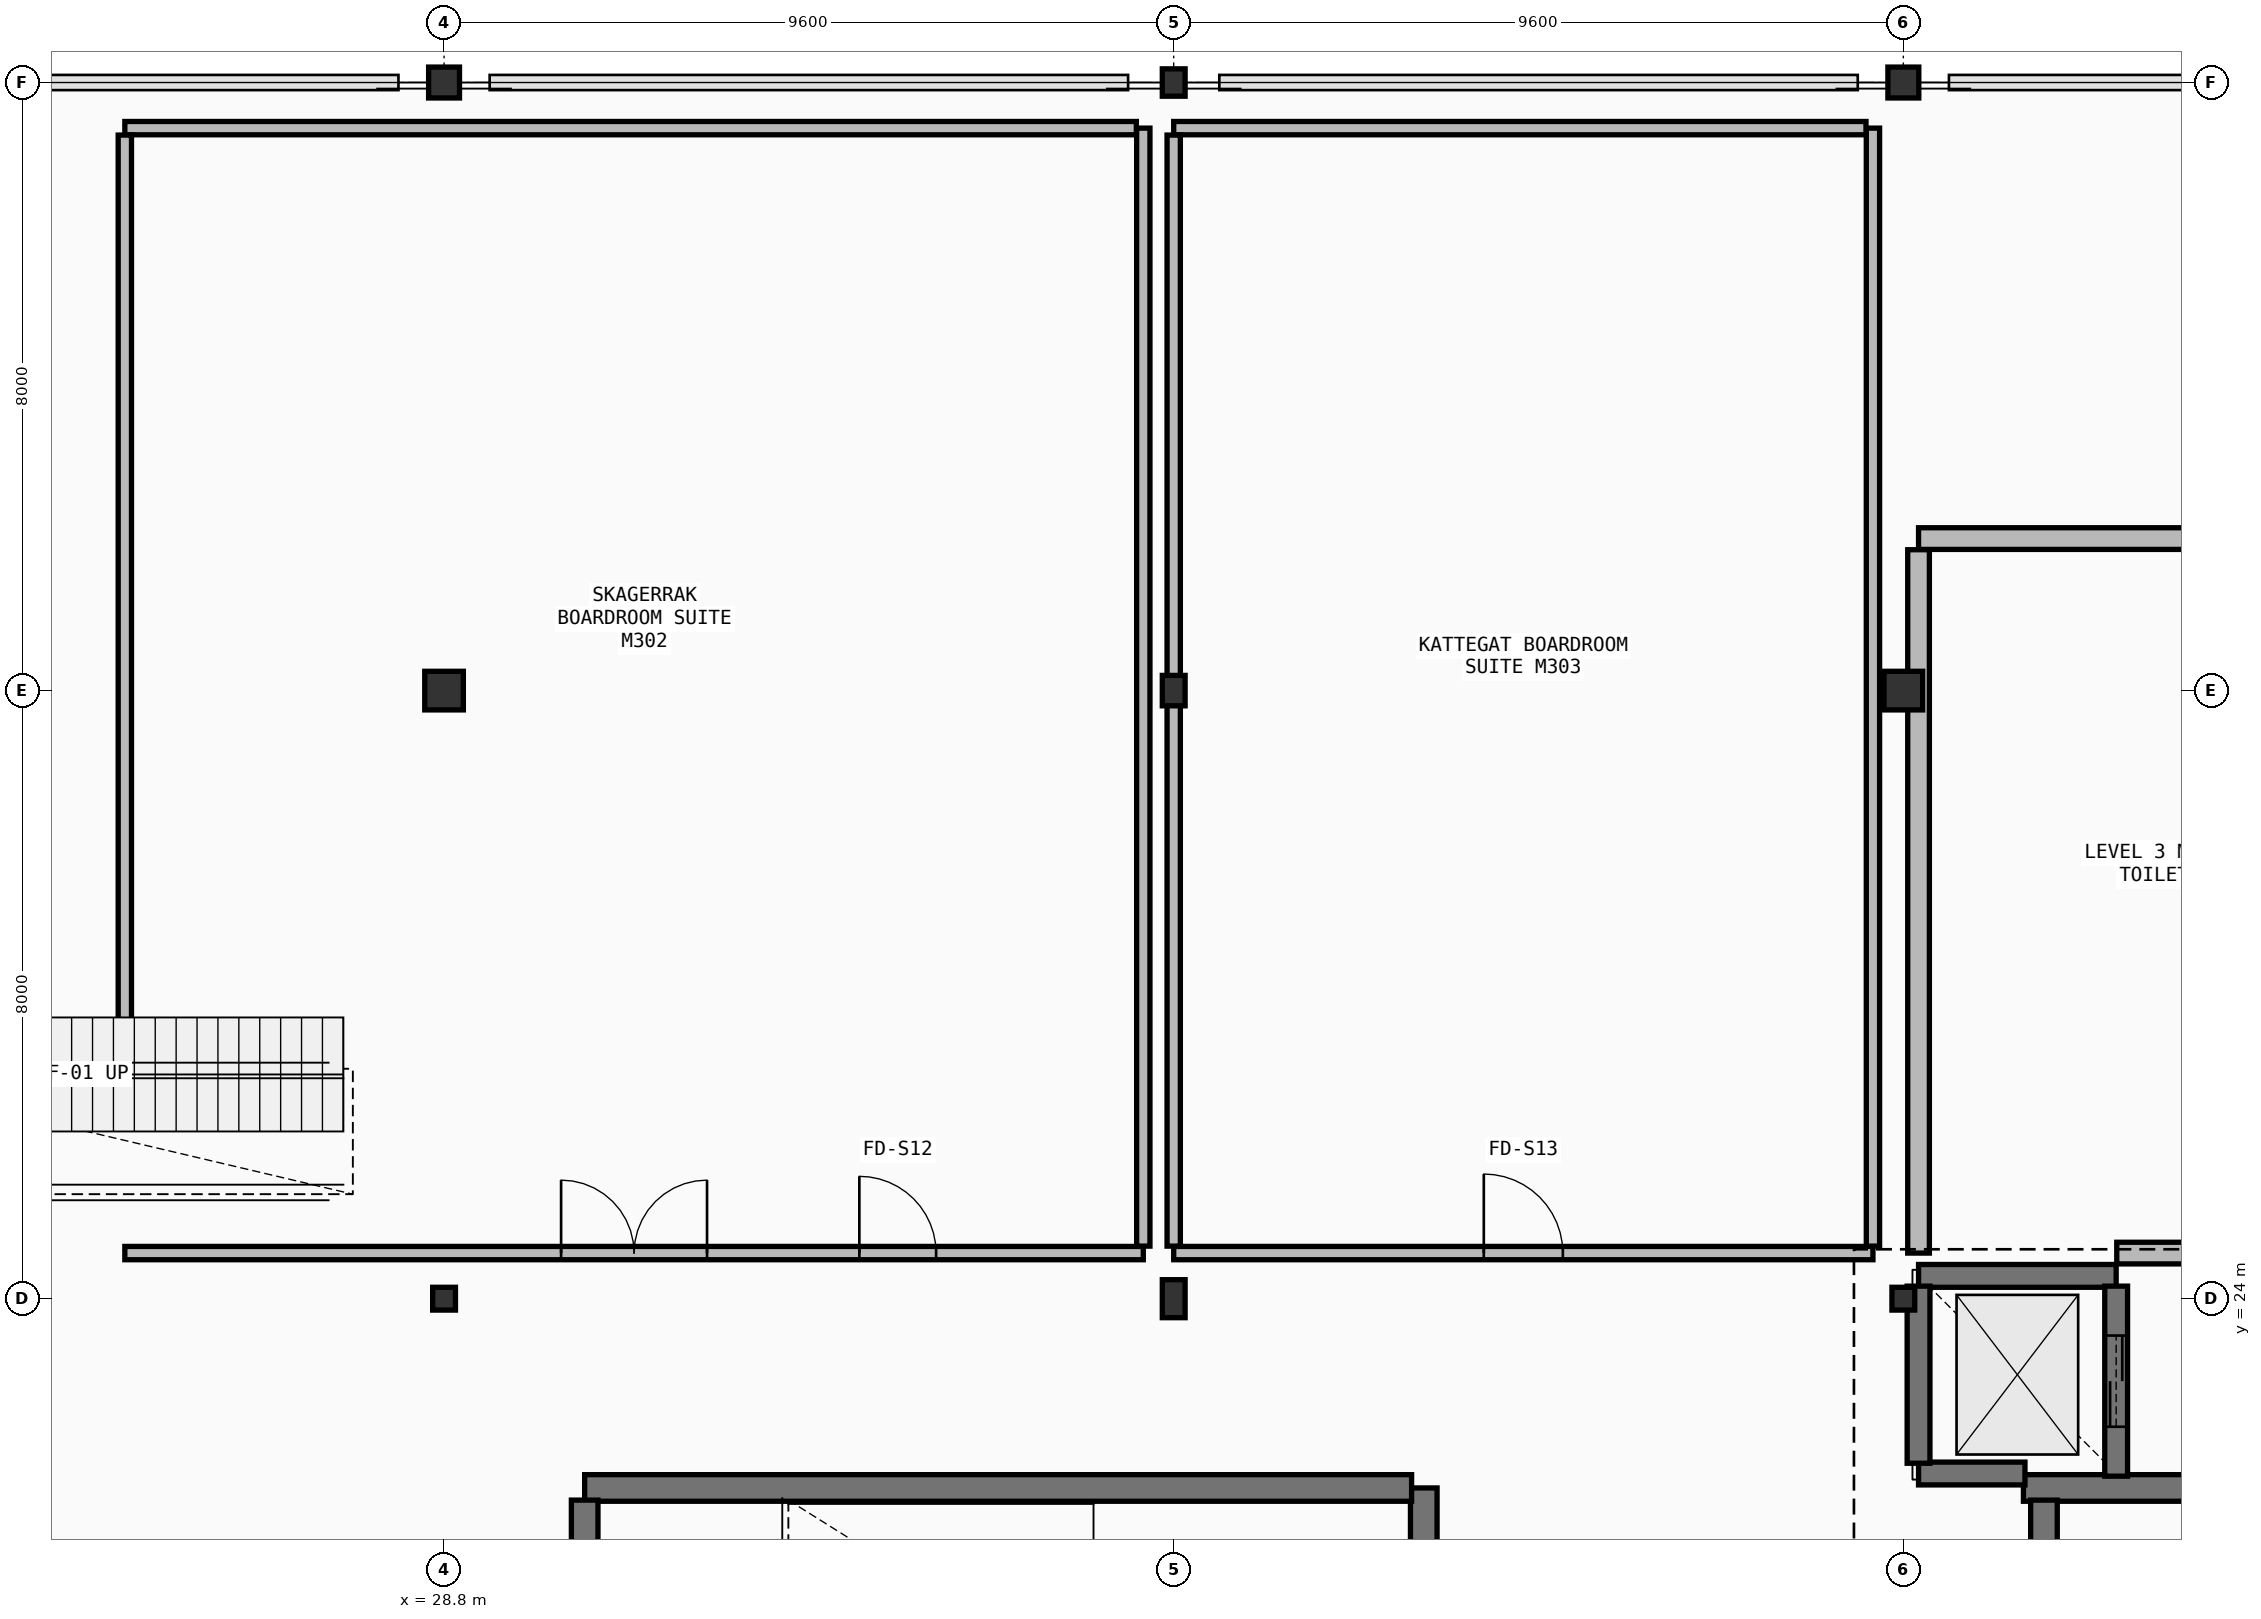
"""IFC4 building model, lengths in metres.
Left out: names, types, materials, properties, quantities, classifications, styles, units other than length and angle.
Written with IfcOpenShell. Run it as: python <this file> out.ifc"""

import sys

from ifc_helpers import new_model, si_unit, direction, frame, frame_2d, origin, origin_2d, place, context, subcontext, project, spatial, rectangle, hollow_circle, i_section, extrude, element, fill, save


model = new_model("IFC4")
c1 = context("Model", 3, precision=1e-05, world=origin(), true_north=direction((0.0, 1.0)))
c2 = subcontext(c1, "Body", "Model", "MODEL_VIEW")
j1 = project(units=[si_unit("LENGTHUNIT", "METRE"), si_unit("PLANEANGLEUNIT", "RADIAN")], contexts=[c1])
p1 = place(None, origin())
s1 = spatial("IfcSite", under=j1, at=p1, CompositionType="ELEMENT")
p2 = place(p1, origin())
s2 = spatial("IfcBuilding", under=s1, at=p2, CompositionType="ELEMENT")
p3 = place(p2, frame((0.0, 0.0, 15.9)))
s3 = spatial("IfcBuildingStorey", under=s2, at=p3, CompositionType="ELEMENT", Elevation=15.9)
p4 = place(p3, frame((28.8, 24.0, 0.0), z_axis=(0.0, 0.0, 1.0), x_axis=(1.0, 0.0, 0.0)))
e1 = element("IfcColumn", 1, at=p4, inside=s3, PredefinedType="COLUMN", context=c2, shape_type="SweptSolid", body=[
    extrude(i_section(OverallWidth=0.3, OverallDepth=0.3, WebThickness=0.011, FlangeThickness=0.019, FilletRadius=0.027, at=origin_2d()), origin(), (0.0, 0.0, 1.0), 4.5),
])
p5 = place(p3, frame((28.8, 32.0, 0.0), z_axis=(0.0, 0.0, 1.0), x_axis=(1.0, 0.0, 0.0)))
e2 = element("IfcColumn", 2, at=p5, inside=s3, PredefinedType="COLUMN", context=c2, shape_type="SweptSolid", body=[
    extrude(hollow_circle(Radius=0.254, WallThickness=0.025, at=origin_2d()), origin(), (0.0, 0.0, 1.0), 4.5),
])
p6 = place(p3, frame((28.8, 40.0, 0.0), z_axis=(0.0, 0.0, 1.0), x_axis=(1.0, 0.0, 0.0)))
e3 = element("IfcColumn", 3, at=p6, inside=s3, PredefinedType="COLUMN", context=c2, shape_type="SweptSolid", body=[
    extrude(hollow_circle(Radius=0.203, WallThickness=0.02, at=origin_2d()), origin(), (0.0, 0.0, 1.0), 4.5),
])
p7 = place(p3, frame((38.4, 24.0, 0.0), z_axis=(0.0, 0.0, 1.0), x_axis=(1.0, 0.0, 0.0)))
e4 = element("IfcColumn", 4, at=p7, inside=s3, PredefinedType="COLUMN", context=c2, shape_type="SweptSolid", body=[
    extrude(i_section(OverallWidth=0.3, OverallDepth=0.5, WebThickness=0.014, FlangeThickness=0.028, FilletRadius=0.027, at=origin_2d()), origin(), (0.0, 0.0, 1.0), 4.5),
])
p8 = place(p3, frame((38.4, 32.0, 0.0), z_axis=(0.0, 0.0, 1.0), x_axis=(1.0, 0.0, 0.0)))
e5 = element("IfcColumn", 5, at=p8, inside=s3, PredefinedType="COLUMN", context=c2, shape_type="SweptSolid", body=[
    extrude(i_section(OverallWidth=0.3, OverallDepth=0.4, WebThickness=0.013, FlangeThickness=0.024, FilletRadius=0.027, at=origin_2d()), origin(), (0.0, 0.0, 1.0), 4.5),
])
p9 = place(p3, frame((38.4, 40.0, 0.0), z_axis=(0.0, 0.0, 1.0), x_axis=(1.0, 0.0, 0.0)))
e6 = element("IfcColumn", 6, at=p9, inside=s3, PredefinedType="COLUMN", context=c2, shape_type="SweptSolid", body=[
    extrude(i_section(OverallWidth=0.3, OverallDepth=0.36, WebThickness=0.012, FlangeThickness=0.022, FilletRadius=0.027, at=origin_2d()), origin(), (0.0, 0.0, 1.0), 4.5),
])
p10 = place(p3, frame((48.0, 24.0, 0.0), z_axis=(0.0, 0.0, 1.0), x_axis=(1.0, 0.0, 0.0)))
e7 = element("IfcColumn", 7, at=p10, inside=s3, PredefinedType="COLUMN", context=c2, shape_type="SweptSolid", body=[
    extrude(i_section(OverallWidth=0.3, OverallDepth=0.3, WebThickness=0.011, FlangeThickness=0.019, FilletRadius=0.027, at=origin_2d()), origin(), (0.0, 0.0, 1.0), 4.5),
])
p11 = place(p3, frame((48.0, 32.0, 0.0), z_axis=(0.0, 0.0, 1.0), x_axis=(1.0, 0.0, 0.0)))
e8 = element("IfcColumn", 8, at=p11, inside=s3, PredefinedType="COLUMN", context=c2, shape_type="SweptSolid", body=[
    extrude(hollow_circle(Radius=0.254, WallThickness=0.025, at=origin_2d()), origin(), (0.0, 0.0, 1.0), 4.5),
])
p12 = place(p3, frame((48.0, 40.0, 0.0), z_axis=(0.0, 0.0, 1.0), x_axis=(1.0, 0.0, 0.0)))
e9 = element("IfcColumn", 9, at=p12, inside=s3, PredefinedType="COLUMN", context=c2, shape_type="SweptSolid", body=[
    extrude(hollow_circle(Radius=0.203, WallThickness=0.02, at=origin_2d()), origin(), (0.0, 0.0, 1.0), 4.5),
])
p13 = place(p3, frame((60.73, 21.51, 0.0), z_axis=(0.0, 0.0, 1.0), x_axis=(-1.0, 0.0, 0.0)))
e10 = element("IfcWall", 10, at=p13, inside=s3, PredefinedType="SHEAR", context=c2, shape_type="SweptSolid", body=[
    extrude(rectangle(XDim=11.15, YDim=0.35, at=frame_2d((5.575, 0.0))), origin(), (0.0, 0.0, 1.0), 4.276),
])
p14 = place(p3, frame((49.85, 21.35, 0.0), z_axis=(0.0, 0.0, 1.0), x_axis=(0.0, -1.0, 0.0)))
e11 = element("IfcWall", 11, at=p14, inside=s3, PredefinedType="SHEAR", context=c2, shape_type="SweptSolid", body=[
    extrude(rectangle(XDim=5.14, YDim=0.35, at=frame_2d((2.57, 0.0))), origin(), (0.0, 0.0, 1.0), 4.276),
])
p15 = place(p3, frame((41.69, 16.21, 0.0), z_axis=(0.0, 0.0, 1.0), x_axis=(0.0, 1.0, 0.0)))
e12 = element("IfcWall", 12, at=p15, inside=s3, PredefinedType="SHEAR", context=c2, shape_type="SweptSolid", body=[
    extrude(rectangle(XDim=5.3, YDim=0.35, at=frame_2d((2.65, 0.0))), origin(), (0.0, 0.0, 1.0), 4.276),
])
p16 = place(p3, frame((41.53, 21.51, 0.0), z_axis=(0.0, 0.0, 1.0), x_axis=(-1.0, 0.0, 0.0)))
e13 = element("IfcWall", 13, at=p16, inside=s3, PredefinedType="SHEAR", context=c2, shape_type="SweptSolid", body=[
    extrude(rectangle(XDim=10.88, YDim=0.35, at=frame_2d((5.44, 0.0))), origin(), (0.0, 0.0, 1.0), 4.276),
])
p17 = place(p3, frame((30.65, 21.35, 0.0), z_axis=(0.0, 0.0, 1.0), x_axis=(0.0, -1.0, 0.0)))
e14 = element("IfcWall", 14, at=p17, inside=s3, PredefinedType="SHEAR", context=c2, shape_type="SweptSolid", body=[
    extrude(rectangle(XDim=5.14, YDim=0.35, at=frame_2d((2.57, 0.0))), origin(), (0.0, 0.0, 1.0), 4.276),
])
p18 = place(p3, frame((50.8, 24.3, 0.0), z_axis=(0.0, 0.0, 1.0), x_axis=(-1.0, 0.0, 0.0)))
e15 = element("IfcWall", 15, at=p18, inside=s3, PredefinedType="SHEAR", context=c2, shape_type="SweptSolid", body=[
    extrude(rectangle(XDim=2.6, YDim=0.3, at=frame_2d((1.3, 0.0))), origin(), (0.0, 0.0, 1.0), 4.276),
])
p19 = place(p3, frame((48.2, 21.7, 0.0), z_axis=(0.0, 0.0, 1.0), x_axis=(1.0, 0.0, 0.0)))
e16 = element("IfcWall", 16, at=p19, inside=s3, PredefinedType="SHEAR", context=c2, shape_type="SweptSolid", body=[
    extrude(rectangle(XDim=1.4, YDim=0.3, at=frame_2d((0.7, 0.0))), origin(), (0.0, 0.0, 1.0), 4.276),
])
p20 = place(p3, frame((50.8, 21.665, 0.0), z_axis=(0.0, 0.0, 1.0), x_axis=(0.0, 1.0, 0.0)))
e17 = element("IfcWall", 17, at=p20, inside=s3, PredefinedType="SHEAR", context=c2, shape_type="SweptSolid", body=[
    extrude(rectangle(XDim=2.5, YDim=0.3, at=frame_2d((1.25, 0.0))), origin(), (0.0, 0.0, 1.0), 4.276),
])
p21 = place(p20, frame((0.65, 0.0, 0.0)))
e18 = element("IfcOpeningElement", 18, at=p21, cuts=e17, PredefinedType="OPENING", context=c2, shape_type="SweptSolid", body=[
    extrude(rectangle(XDim=1.2, YDim=2.2, at=frame_2d((0.6, 1.1))), frame((0.0, 0.16, 0.0), z_axis=(0.0, -1.0, 0.0), x_axis=(1.0, 0.0, 0.0)), (0.0, 0.0, 1.0), 0.32),
])
p22 = place(p3, frame((48.2, 24.165, 0.0), z_axis=(0.0, 0.0, 1.0), x_axis=(0.0, -1.0, 0.0)))
e19 = element("IfcWall", 19, at=p22, inside=s3, PredefinedType="SHEAR", context=c2, shape_type="SweptSolid", body=[
    extrude(rectangle(XDim=2.33, YDim=0.3, at=frame_2d((1.165, 0.0))), origin(), (0.0, 0.0, 1.0), 4.276),
])
p23 = place(p3, frame((24.6, 24.6, 0.0), z_axis=(0.0, 0.0, 1.0), x_axis=(1.0, 0.0, 0.0)))
e20 = element("IfcWall", 20, at=p23, inside=s3, PredefinedType="PARTITIONING", context=c2, shape_type="SweptSolid", body=[
    extrude(rectangle(XDim=13.4, YDim=0.175, at=frame_2d((6.7, 0.0))), origin(), (0.0, 0.0, 1.0), 3.696),
])
p24 = place(p23, frame((5.74, 0.0, 0.0)))
e21 = element("IfcOpeningElement", 21, at=p24, cuts=e20, PredefinedType="OPENING", context=c2, shape_type="SweptSolid", body=[
    extrude(rectangle(XDim=1.92, YDim=2.3, at=frame_2d((0.96, 1.15))), frame((0.0, 0.097, 0.0), z_axis=(0.0, -1.0, 0.0), x_axis=(1.0, 0.0, 0.0)), (0.0, 0.0, 1.0), 0.195),
])
p25 = place(p23, frame((9.664, 0.0, 0.0)))
e22 = element("IfcOpeningElement", 22, at=p25, cuts=e20, PredefinedType="OPENING", context=c2, shape_type="SweptSolid", body=[
    extrude(rectangle(XDim=1.01, YDim=2.22, at=frame_2d((0.505, 1.11))), frame((0.0, 0.097, 0.0), z_axis=(0.0, -1.0, 0.0), x_axis=(1.0, 0.0, 0.0)), (0.0, 0.0, 1.0), 0.195),
])
p26 = place(p3, frame((38.0, 24.691, 0.0), z_axis=(0.0, 0.0, 1.0), x_axis=(0.0, 1.0, 0.0)))
e23 = element("IfcWall", 23, at=p26, inside=s3, PredefinedType="PARTITIONING", context=c2, shape_type="SweptSolid", body=[
    extrude(rectangle(XDim=14.708, YDim=0.175, at=frame_2d((7.354, 0.0))), origin(), (0.0, 0.0, 1.0), 3.446),
])
p27 = place(p3, frame((37.908, 39.4, 0.0), z_axis=(0.0, 0.0, 1.0), x_axis=(-1.0, 0.0, 0.0)))
e24 = element("IfcWall", 24, at=p27, inside=s3, PredefinedType="PARTITIONING", context=c2, shape_type="SweptSolid", body=[
    extrude(rectangle(XDim=13.308, YDim=0.175, at=frame_2d((6.654, 0.0))), origin(), (0.0, 0.0, 1.0), 3.346),
])
p28 = place(p3, frame((24.6, 39.309, 0.0), z_axis=(0.0, 0.0, 1.0), x_axis=(0.0, -1.0, 0.0)))
e25 = element("IfcWall", 25, at=p28, inside=s3, PredefinedType="PARTITIONING", context=c2, shape_type="SweptSolid", body=[
    extrude(rectangle(XDim=11.833, YDim=0.175, at=frame_2d((5.917, 0.0))), origin(), (0.0, 0.0, 1.0), 3.746),
])
p29 = place(p3, frame((38.4, 24.6, 0.0), z_axis=(0.0, 0.0, 1.0), x_axis=(1.0, 0.0, 0.0)))
e26 = element("IfcWall", 26, at=p29, inside=s3, PredefinedType="PARTITIONING", context=c2, shape_type="SweptSolid", body=[
    extrude(rectangle(XDim=9.2, YDim=0.175, at=frame_2d((4.6, 0.0))), origin(), (0.0, 0.0, 1.0), 3.346),
])
p30 = place(p29, frame((4.08, 0.0, 0.0)))
e27 = element("IfcOpeningElement", 27, at=p30, cuts=e26, PredefinedType="OPENING", context=c2, shape_type="SweptSolid", body=[
    extrude(rectangle(XDim=1.04, YDim=2.24, at=frame_2d((0.52, 1.12))), frame((0.0, 0.097, 0.0), z_axis=(0.0, -1.0, 0.0), x_axis=(1.0, 0.0, 0.0)), (0.0, 0.0, 1.0), 0.195),
])
p31 = place(p3, frame((47.6, 24.691, 0.0), z_axis=(0.0, 0.0, 1.0), x_axis=(0.0, 1.0, 0.0)))
e28 = element("IfcWall", 28, at=p31, inside=s3, PredefinedType="PARTITIONING", context=c2, shape_type="SweptSolid", body=[
    extrude(rectangle(XDim=14.708, YDim=0.175, at=frame_2d((7.354, 0.0))), origin(), (0.0, 0.0, 1.0), 3.546),
])
p32 = place(p3, frame((47.509, 39.4, 0.0), z_axis=(0.0, 0.0, 1.0), x_axis=(-1.0, 0.0, 0.0)))
e29 = element("IfcWall", 29, at=p32, inside=s3, PredefinedType="PARTITIONING", context=c2, shape_type="SweptSolid", body=[
    extrude(rectangle(XDim=9.109, YDim=0.175, at=frame_2d((4.554, 0.0))), origin(), (0.0, 0.0, 1.0), 3.546),
])
p33 = place(p3, frame((38.4, 39.309, 0.0), z_axis=(0.0, 0.0, 1.0), x_axis=(0.0, -1.0, 0.0)))
e30 = element("IfcWall", 30, at=p33, inside=s3, PredefinedType="PARTITIONING", context=c2, shape_type="SweptSolid", body=[
    extrude(rectangle(XDim=14.617, YDim=0.175, at=frame_2d((7.309, 0.0))), origin(), (0.0, 0.0, 1.0), 3.346),
])
p34 = place(p3, frame((50.808, 24.6, 0.0), z_axis=(0.0, 0.0, 1.0), x_axis=(1.0, 0.0, 0.0)))
e31 = element("IfcWall", 31, at=p34, inside=s3, PredefinedType="PLUMBINGWALL", context=c2, shape_type="SweptSolid", body=[
    extrude(rectangle(XDim=3.592, YDim=0.285, at=frame_2d((1.796, 0.0))), origin(), (0.0, 0.0, 1.0), 4.276),
])
p35 = place(p34, frame((1.448, 0.0, 0.0)))
e32 = element("IfcOpeningElement", 32, at=p35, cuts=e31, PredefinedType="OPENING", context=c2, shape_type="SweptSolid", body=[
    extrude(rectangle(XDim=0.96, YDim=2.45, at=frame_2d((0.48, 1.225))), frame((0.0, 0.152, 0.0), z_axis=(0.0, -1.0, 0.0), x_axis=(1.0, 0.0, 0.0)), (0.0, 0.0, 1.0), 0.305),
])
p36 = place(p3, frame((54.253, 34.0, 0.0), z_axis=(0.0, 0.0, 1.0), x_axis=(-1.0, 0.0, 0.0)))
e33 = element("IfcWall", 33, at=p36, inside=s3, PredefinedType="PLUMBINGWALL", context=c2, shape_type="SweptSolid", body=[
    extrude(rectangle(XDim=6.053, YDim=0.285, at=frame_2d((3.027, 0.0))), origin(), (0.0, 0.0, 1.0), 4.276),
])
p37 = place(p3, frame((48.2, 33.854, 0.0), z_axis=(0.0, 0.0, 1.0), x_axis=(0.0, -1.0, 0.0)))
e34 = element("IfcWall", 34, at=p37, inside=s3, PredefinedType="PLUMBINGWALL", context=c2, shape_type="SweptSolid", body=[
    extrude(rectangle(XDim=9.253, YDim=0.285, at=frame_2d((4.627, 0.0))), origin(), (0.0, 0.0, 1.0), 3.546),
])
p38 = place(p21, origin())
e35 = element("IfcDoor", 35, at=p38, inside=s3, OperationType="DOUBLE_DOOR_SLIDING", PredefinedType="DOOR", context=c2, shape_type="SweptSolid", body=[
    extrude(rectangle(XDim=1.2, YDim=2.2, at=frame_2d((0.6, 1.1))), frame((0.0, 0.025, 0.0), z_axis=(0.0, -1.0, 0.0), x_axis=(1.0, 0.0, 0.0)), (0.0, 0.0, 1.0), 0.05),
])
fill(e18, e35)
p39 = place(p24, origin())
e36 = element("IfcDoor", 36, at=p39, inside=s3, OperationType="DOUBLE_DOOR_SINGLE_SWING", PredefinedType="DOOR", context=c2, shape_type="SweptSolid", body=[
    extrude(rectangle(XDim=1.92, YDim=2.3, at=frame_2d((0.96, 1.15))), frame((0.0, 0.025, 0.0), z_axis=(0.0, -1.0, 0.0), x_axis=(1.0, 0.0, 0.0)), (0.0, 0.0, 1.0), 0.05),
])
fill(e21, e36)
p40 = place(p25, origin())
e37 = element("IfcDoor", 37, at=p40, inside=s3, OperationType="SINGLE_SWING_LEFT", PredefinedType="DOOR", context=c2, shape_type="SweptSolid", body=[
    extrude(rectangle(XDim=1.01, YDim=2.22, at=frame_2d((0.505, 1.11))), frame((0.0, 0.025, 0.0), z_axis=(0.0, -1.0, 0.0), x_axis=(1.0, 0.0, 0.0)), (0.0, 0.0, 1.0), 0.05),
])
fill(e22, e37)
p41 = place(p30, origin())
e38 = element("IfcDoor", 38, at=p41, inside=s3, OperationType="SINGLE_SWING_RIGHT", PredefinedType="DOOR", context=c2, shape_type="SweptSolid", body=[
    extrude(rectangle(XDim=1.04, YDim=2.24, at=frame_2d((0.52, 1.12))), frame((0.0, 0.025, 0.0), z_axis=(0.0, -1.0, 0.0), x_axis=(1.0, 0.0, 0.0)), (0.0, 0.0, 1.0), 0.05),
])
fill(e27, e38)
save(model, sys.argv[1])
